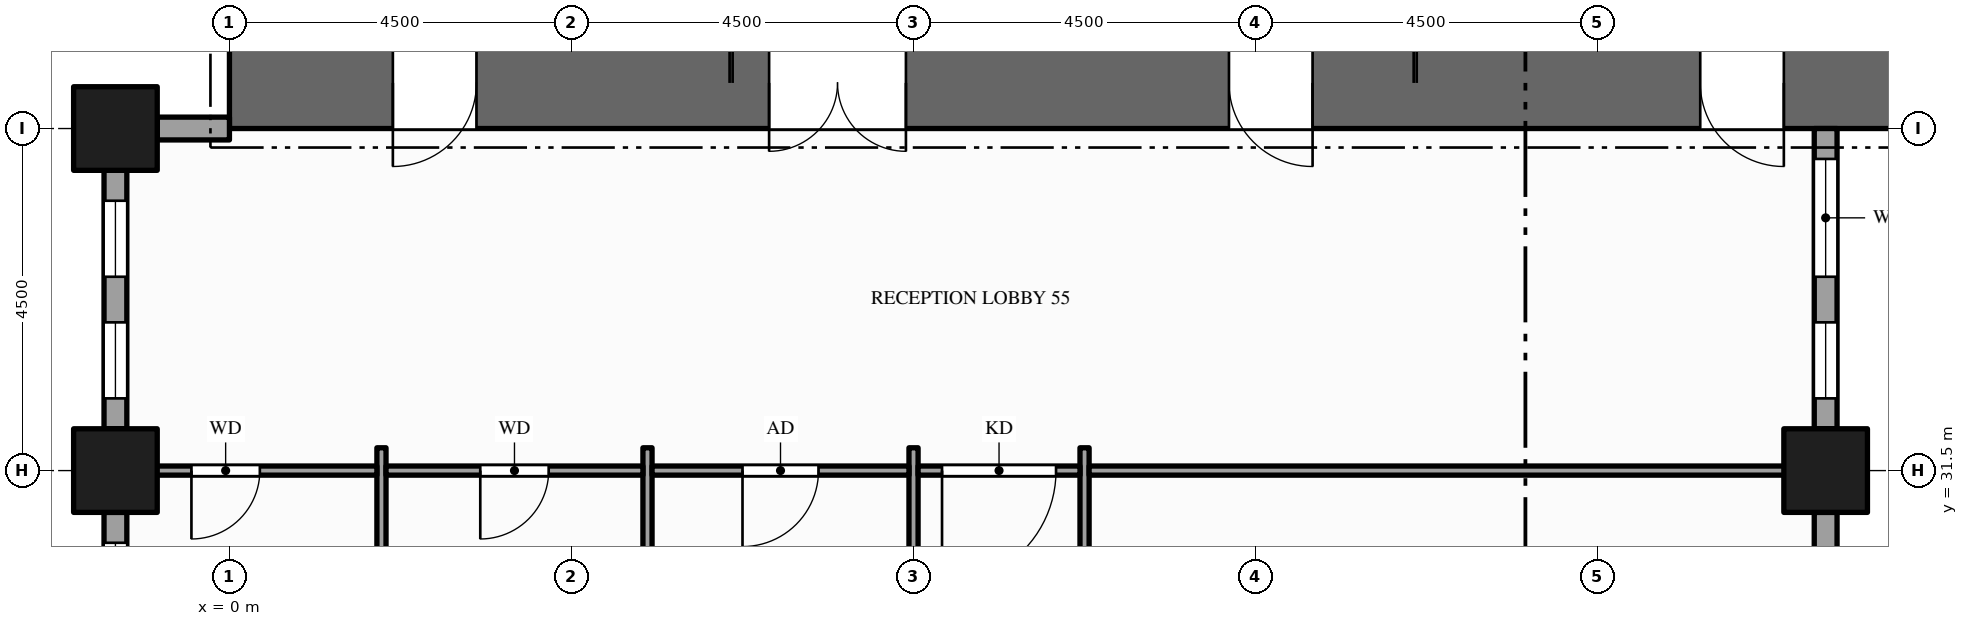
"""IFC4 building model, lengths in metres.
Left out: names, types, materials, properties, quantities, classifications, styles, units other than length and angle.
Written with IfcOpenShell. Run it as: python <this file> out.ifc"""

import sys

from ifc_helpers import new_model, si_unit, direction, frame, frame_2d, origin, origin_2d, place, context, subcontext, project, spatial, rectangle, hollow_rectangle, extrude, element, fill, save


model = new_model("IFC4")
c1 = context("Model", 3, precision=1e-05, world=origin(), true_north=direction((0.0, 1.0)))
c2 = subcontext(c1, "Body", "Model", "MODEL_VIEW")
j1 = project(units=[si_unit("LENGTHUNIT", "METRE"), si_unit("PLANEANGLEUNIT", "RADIAN")], contexts=[c1])
p1 = place(None, origin())
s1 = spatial("IfcSite", under=j1, at=p1, CompositionType="ELEMENT")
p2 = place(p1, origin())
s2 = spatial("IfcBuilding", under=s1, at=p2, CompositionType="ELEMENT")
p3 = place(p2, frame((0.0, 0.0, 69.0)))
s3 = spatial("IfcBuildingStorey", under=s2, at=p3, CompositionType="ELEMENT", Elevation=69.0)
p4 = place(p3, frame((0.0, 36.6, -0.15), z_axis=(0.0, 0.0, 1.0), x_axis=(1.0, 0.0, 0.0)))
e1 = element("IfcWall", 1, at=p4, inside=s3, PredefinedType="SHEAR", context=c2, shape_type="SweptSolid", body=[
    extrude(rectangle(XDim=22.5, YDim=1.2, at=frame_2d((11.25, 0.0))), origin(), (0.0, 0.0, 1.0), 4.0),
])
p5 = place(p4, frame((7.1, 0.0, 0.15)))
e2 = element("IfcOpeningElement", 2, at=p5, cuts=e1, PredefinedType="OPENING", context=c2, shape_type="SweptSolid", body=[
    extrude(rectangle(XDim=1.8, YDim=2.1, at=frame_2d((0.9, 1.05))), frame((0.0, 0.61, 0.0), z_axis=(0.0, -1.0, 0.0), x_axis=(1.0, 0.0, 0.0)), (0.0, 0.0, 1.0), 1.22),
])
p6 = place(p4, frame((13.15, 0.0, 0.15)))
e3 = element("IfcOpeningElement", 3, at=p6, cuts=e1, PredefinedType="OPENING", context=c2, shape_type="SweptSolid", body=[
    extrude(rectangle(XDim=1.1, YDim=2.1, at=frame_2d((0.55, 1.05))), frame((0.0, 0.61, 0.0), z_axis=(0.0, -1.0, 0.0), x_axis=(1.0, 0.0, 0.0)), (0.0, 0.0, 1.0), 1.22),
])
p7 = place(p4, frame((2.15, 0.0, 0.15)))
e4 = element("IfcOpeningElement", 4, at=p7, cuts=e1, PredefinedType="OPENING", context=c2, shape_type="SweptSolid", body=[
    extrude(rectangle(XDim=1.1, YDim=2.1, at=frame_2d((0.55, 1.05))), frame((0.0, 0.61, 0.0), z_axis=(0.0, -1.0, 0.0), x_axis=(1.0, 0.0, 0.0)), (0.0, 0.0, 1.0), 1.22),
])
p8 = place(p4, frame((19.35, 0.0, 0.15)))
e5 = element("IfcOpeningElement", 5, at=p8, cuts=e1, PredefinedType="OPENING", context=c2, shape_type="SweptSolid", body=[
    extrude(rectangle(XDim=1.1, YDim=2.1, at=frame_2d((0.55, 1.05))), frame((0.0, 0.61, 0.0), z_axis=(0.0, -1.0, 0.0), x_axis=(1.0, 0.0, 0.0)), (0.0, 0.0, 1.0), 1.22),
])
for number, where, z_axis, x_axis in (
    (6, (-1.5, 31.5, -0.15), (0.0, 0.0, 1.0), (1.0, 0.0, 0.0)),
    (7, (-1.5, 36.0, -0.15), (0.0, 0.0, 1.0), (1.0, 0.0, 0.0)),
    (8, (21.0, 31.5, -0.15), (0.0, 0.0, 1.0), (1.0, 0.0, 0.0)),
):
    element("IfcColumn", number, at=place(p3, frame(where, z_axis=z_axis, x_axis=x_axis)), inside=s3, PredefinedType="COLUMN", context=c2, shape_type="SweptSolid", body=[
        extrude(hollow_rectangle(XDim=1.1, YDim=1.1, WallThickness=0.06, at=origin_2d()), origin(), (0.0, 0.0, 1.0), 4.0),
    ])
p9 = place(p3, frame((21.0, 29.05, 0.0), z_axis=(0.0, 0.0, 1.0), x_axis=(0.0, 1.0, 0.0)))
e9 = element("IfcWall", 9, at=p9, inside=s3, PredefinedType="STANDARD", context=c2, shape_type="SweptSolid", body=[
    extrude(rectangle(XDim=1.9, YDim=0.3, at=frame_2d((0.95, 0.0))), origin(), (0.0, 0.0, 1.0), 3.144),
])
p10 = place(p3, frame((21.0, 32.05, 0.0), z_axis=(0.0, 0.0, 1.0), x_axis=(0.0, 1.0, 0.0)))
e10 = element("IfcWall", 10, at=p10, inside=s3, PredefinedType="STANDARD", context=c2, shape_type="SweptSolid", body=[
    extrude(rectangle(XDim=3.95, YDim=0.3, at=frame_2d((1.975, 0.0))), origin(), (0.0, 0.0, 1.0), 3.144),
])
p11 = place(p10, frame((0.4, 0.0, 0.9)))
e11 = element("IfcOpeningElement", 11, at=p11, cuts=e10, PredefinedType="OPENING", context=c2, shape_type="SweptSolid", body=[
    extrude(rectangle(XDim=1.0, YDim=2.0, at=frame_2d((0.5, 1.0))), frame((0.0, 0.16, 0.0), z_axis=(0.0, -1.0, 0.0), x_axis=(1.0, 0.0, 0.0)), (0.0, 0.0, 1.0), 0.32),
])
p12 = place(p10, frame((2.0, 0.0, 0.9)))
e12 = element("IfcOpeningElement", 12, at=p12, cuts=e10, PredefinedType="OPENING", context=c2, shape_type="SweptSolid", body=[
    extrude(rectangle(XDim=1.55, YDim=2.0, at=frame_2d((0.775, 1.0))), frame((0.0, 0.16, 0.0), z_axis=(0.0, -1.0, 0.0), x_axis=(1.0, 0.0, 0.0)), (0.0, 0.0, 1.0), 0.32),
])
p13 = place(p3, frame((0.0, 36.0, 0.0), z_axis=(0.0, 0.0, 1.0), x_axis=(-1.0, 0.0, 0.0)))
e13 = element("IfcWall", 13, at=p13, inside=s3, PredefinedType="STANDARD", context=c2, shape_type="SweptSolid", body=[
    extrude(rectangle(XDim=0.95, YDim=0.3, at=frame_2d((0.475, 0.0))), origin(), (0.0, 0.0, 1.0), 2.938),
])
p14 = place(p3, frame((-1.5, 35.45, 0.0), z_axis=(0.0, 0.0, 1.0), x_axis=(0.0, -1.0, 0.0)))
e14 = element("IfcWall", 14, at=p14, inside=s3, PredefinedType="STANDARD", context=c2, shape_type="SweptSolid", body=[
    extrude(rectangle(XDim=3.4, YDim=0.3, at=frame_2d((1.7, 0.0))), origin(), (0.0, 0.0, 1.0), 3.144),
])
p15 = place(p14, frame((0.4, 0.0, 0.9)))
e15 = element("IfcOpeningElement", 15, at=p15, cuts=e14, PredefinedType="OPENING", context=c2, shape_type="SweptSolid", body=[
    extrude(rectangle(XDim=1.0, YDim=2.0, at=frame_2d((0.5, 1.0))), frame((0.0, 0.16, 0.0), z_axis=(0.0, -1.0, 0.0), x_axis=(1.0, 0.0, 0.0)), (0.0, 0.0, 1.0), 0.32),
])
p16 = place(p14, frame((2.0, 0.0, 0.9)))
e16 = element("IfcOpeningElement", 16, at=p16, cuts=e14, PredefinedType="OPENING", context=c2, shape_type="SweptSolid", body=[
    extrude(rectangle(XDim=1.0, YDim=2.0, at=frame_2d((0.5, 1.0))), frame((0.0, 0.16, 0.0), z_axis=(0.0, -1.0, 0.0), x_axis=(1.0, 0.0, 0.0)), (0.0, 0.0, 1.0), 0.32),
])
p17 = place(p3, frame((-1.5, 30.95, 0.0), z_axis=(0.0, 0.0, 1.0), x_axis=(0.0, -1.0, 0.0)))
e17 = element("IfcWall", 17, at=p17, inside=s3, PredefinedType="STANDARD", context=c2, shape_type="SweptSolid", body=[
    extrude(rectangle(XDim=3.4, YDim=0.3, at=frame_2d((1.7, 0.0))), origin(), (0.0, 0.0, 1.0), 3.144),
])
p18 = place(p17, frame((0.4, 0.0, 0.9)))
e18 = element("IfcOpeningElement", 18, at=p18, cuts=e17, PredefinedType="OPENING", context=c2, shape_type="SweptSolid", body=[
    extrude(rectangle(XDim=1.0, YDim=2.0, at=frame_2d((0.5, 1.0))), frame((0.0, 0.16, 0.0), z_axis=(0.0, -1.0, 0.0), x_axis=(1.0, 0.0, 0.0)), (0.0, 0.0, 1.0), 0.32),
])
p19 = place(p17, frame((2.0, 0.0, 0.9)))
e19 = element("IfcOpeningElement", 19, at=p19, cuts=e17, PredefinedType="OPENING", context=c2, shape_type="SweptSolid", body=[
    extrude(rectangle(XDim=1.0, YDim=2.0, at=frame_2d((0.5, 1.0))), frame((0.0, 0.16, 0.0), z_axis=(0.0, -1.0, 0.0), x_axis=(1.0, 0.0, 0.0)), (0.0, 0.0, 1.0), 0.32),
])
for number, where, z_axis, x_axis in (
    (20, (2.0, 26.7, 0.0), (0.0, 0.0, 1.0), (0.0, 1.0, 0.0)),
    (21, (5.5, 26.7, 0.0), (0.0, 0.0, 1.0), (0.0, 1.0, 0.0)),
):
    element("IfcWall", number, at=place(p3, frame(where, z_axis=z_axis, x_axis=x_axis)), inside=s3, PredefinedType="PARTITIONING", context=c2, shape_type="SweptSolid", body=[
        extrude(rectangle(XDim=5.1, YDim=0.12, at=frame_2d((2.55, 0.0))), origin(), (0.0, 0.0, 1.0), 3.85),
    ])
p20 = place(p3, frame((9.0, 10.95, 0.0), z_axis=(0.0, 0.0, 1.0), x_axis=(0.0, 1.0, 0.0)))
e22 = element("IfcWall", 22, at=p20, inside=s3, PredefinedType="PARTITIONING", context=c2, shape_type="SweptSolid", body=[
    extrude(rectangle(XDim=20.85, YDim=0.12, at=frame_2d((10.425, 0.0))), origin(), (0.0, 0.0, 1.0), 2.6),
])
p21 = place(p20, frame((3.9, 0.0, 0.0)))
e23 = element("IfcOpeningElement", 23, at=p21, cuts=e22, PredefinedType="OPENING", context=c2, shape_type="SweptSolid", body=[
    extrude(rectangle(XDim=1.8, YDim=2.1, at=frame_2d((0.9, 1.05))), frame((0.0, 0.07, 0.0), z_axis=(0.0, -1.0, 0.0), x_axis=(1.0, 0.0, 0.0)), (0.0, 0.0, 1.0), 0.14),
])
p22 = place(p20, frame((12.205, 0.0, 0.0)))
e24 = element("IfcOpeningElement", 24, at=p22, cuts=e22, PredefinedType="OPENING", context=c2, shape_type="SweptSolid", body=[
    extrude(rectangle(XDim=1.0, YDim=2.1, at=frame_2d((0.5, 1.05))), frame((0.0, 0.07, 0.0), z_axis=(0.0, -1.0, 0.0), x_axis=(1.0, 0.0, 0.0)), (0.0, 0.0, 1.0), 0.14),
])
p23 = place(p3, frame((11.25, 10.95, 0.0), z_axis=(0.0, 0.0, 1.0), x_axis=(0.0, 1.0, 0.0)))
e25 = element("IfcWall", 25, at=p23, inside=s3, PredefinedType="PARTITIONING", context=c2, shape_type="SweptSolid", body=[
    extrude(rectangle(XDim=20.85, YDim=0.12, at=frame_2d((10.425, 0.0))), origin(), (0.0, 0.0, 1.0), 2.6),
])
p24 = place(p23, frame((4.2, 0.0, 0.0)))
e26 = element("IfcOpeningElement", 26, at=p24, cuts=e25, PredefinedType="OPENING", context=c2, shape_type="SweptSolid", body=[
    extrude(rectangle(XDim=1.2, YDim=2.1, at=frame_2d((0.6, 1.05))), frame((0.0, 0.07, 0.0), z_axis=(0.0, -1.0, 0.0), x_axis=(1.0, 0.0, 0.0)), (0.0, 0.0, 1.0), 0.14),
])
p25 = place(p3, frame((-1.35, 31.5, 0.0), z_axis=(0.0, 0.0, 1.0), x_axis=(1.0, 0.0, 0.0)))
e27 = element("IfcWall", 27, at=p25, inside=s3, PredefinedType="PARTITIONING", context=c2, shape_type="SweptSolid", body=[
    extrude(rectangle(XDim=3.29, YDim=0.12, at=frame_2d((1.645, 0.0))), origin(), (0.0, 0.0, 1.0), 2.938),
])
p26 = place(p25, frame((0.85, 0.0, 0.0)))
e28 = element("IfcOpeningElement", 28, at=p26, cuts=e27, PredefinedType="OPENING", context=c2, shape_type="SweptSolid", body=[
    extrude(rectangle(XDim=0.9, YDim=2.1, at=frame_2d((0.45, 1.05))), frame((0.0, 0.07, 0.0), z_axis=(0.0, -1.0, 0.0), x_axis=(1.0, 0.0, 0.0)), (0.0, 0.0, 1.0), 0.14),
])
p27 = place(p3, frame((2.06, 31.5, 0.0), z_axis=(0.0, 0.0, 1.0), x_axis=(1.0, 0.0, 0.0)))
e29 = element("IfcWall", 29, at=p27, inside=s3, PredefinedType="PARTITIONING", context=c2, shape_type="SweptSolid", body=[
    extrude(rectangle(XDim=3.38, YDim=0.12, at=frame_2d((1.69, 0.0))), origin(), (0.0, 0.0, 1.0), 2.938),
])
p28 = place(p27, frame((1.24, 0.0, 0.0)))
e30 = element("IfcOpeningElement", 30, at=p28, cuts=e29, PredefinedType="OPENING", context=c2, shape_type="SweptSolid", body=[
    extrude(rectangle(XDim=0.9, YDim=2.1, at=frame_2d((0.45, 1.05))), frame((0.0, 0.07, 0.0), z_axis=(0.0, -1.0, 0.0), x_axis=(1.0, 0.0, 0.0)), (0.0, 0.0, 1.0), 0.14),
])
p29 = place(p3, frame((5.56, 31.5, 0.0), z_axis=(0.0, 0.0, 1.0), x_axis=(1.0, 0.0, 0.0)))
e31 = element("IfcWall", 31, at=p29, inside=s3, PredefinedType="PARTITIONING", context=c2, shape_type="SweptSolid", body=[
    extrude(rectangle(XDim=3.38, YDim=0.12, at=frame_2d((1.69, 0.0))), origin(), (0.0, 0.0, 1.0), 2.938),
])
p30 = place(p29, frame((1.19, 0.0, 0.0)))
e32 = element("IfcOpeningElement", 32, at=p30, cuts=e31, PredefinedType="OPENING", context=c2, shape_type="SweptSolid", body=[
    extrude(rectangle(XDim=1.0, YDim=2.1, at=frame_2d((0.5, 1.05))), frame((0.0, 0.07, 0.0), z_axis=(0.0, -1.0, 0.0), x_axis=(1.0, 0.0, 0.0)), (0.0, 0.0, 1.0), 0.14),
])
p31 = place(p3, frame((9.06, 31.5, 0.0), z_axis=(0.0, 0.0, 1.0), x_axis=(1.0, 0.0, 0.0)))
e33 = element("IfcWall", 33, at=p31, inside=s3, PredefinedType="PARTITIONING", context=c2, shape_type="SweptSolid", body=[
    extrude(rectangle(XDim=2.13, YDim=0.12, at=frame_2d((1.065, 0.0))), origin(), (0.0, 0.0, 1.0), 2.938),
])
p32 = place(p31, frame((0.315, 0.0, 0.0)))
e34 = element("IfcOpeningElement", 34, at=p32, cuts=e33, PredefinedType="OPENING", context=c2, shape_type="SweptSolid", body=[
    extrude(rectangle(XDim=1.5, YDim=2.1, at=frame_2d((0.75, 1.05))), frame((0.0, 0.07, 0.0), z_axis=(0.0, -1.0, 0.0), x_axis=(1.0, 0.0, 0.0)), (0.0, 0.0, 1.0), 0.14),
])
p33 = place(p3, frame((11.31, 31.5, 0.0), z_axis=(0.0, 0.0, 1.0), x_axis=(1.0, 0.0, 0.0)))
e35 = element("IfcWall", 35, at=p33, inside=s3, PredefinedType="PARTITIONING", context=c2, shape_type="SweptSolid", body=[
    extrude(rectangle(XDim=9.54, YDim=0.12, at=frame_2d((4.77, 0.0))), origin(), (0.0, 0.0, 1.0), 2.938),
])
p34 = place(p11, origin())
e36 = element("IfcWindow", 36, at=p34, inside=s3, PartitioningType="SINGLE_PANEL", PredefinedType="WINDOW", context=c2, shape_type="SweptSolid", body=[
    extrude(rectangle(XDim=1.0, YDim=2.0, at=frame_2d((0.5, 1.0))), frame((0.0, 0.03, 0.0), z_axis=(0.0, -1.0, 0.0), x_axis=(1.0, 0.0, 0.0)), (0.0, 0.0, 1.0), 0.06),
])
fill(e11, e36)
p35 = place(p12, origin())
e37 = element("IfcWindow", 37, at=p35, inside=s3, PartitioningType="SINGLE_PANEL", PredefinedType="WINDOW", context=c2, shape_type="SweptSolid", body=[
    extrude(rectangle(XDim=1.55, YDim=2.0, at=frame_2d((0.775, 1.0))), frame((0.0, 0.03, 0.0), z_axis=(0.0, -1.0, 0.0), x_axis=(1.0, 0.0, 0.0)), (0.0, 0.0, 1.0), 0.06),
])
fill(e12, e37)
p36 = place(p15, origin())
e38 = element("IfcWindow", 38, at=p36, inside=s3, PartitioningType="SINGLE_PANEL", PredefinedType="WINDOW", context=c2, shape_type="SweptSolid", body=[
    extrude(rectangle(XDim=1.0, YDim=2.0, at=frame_2d((0.5, 1.0))), frame((0.0, 0.03, 0.0), z_axis=(0.0, -1.0, 0.0), x_axis=(1.0, 0.0, 0.0)), (0.0, 0.0, 1.0), 0.06),
])
fill(e15, e38)
p37 = place(p16, origin())
e39 = element("IfcWindow", 39, at=p37, inside=s3, PartitioningType="SINGLE_PANEL", PredefinedType="WINDOW", context=c2, shape_type="SweptSolid", body=[
    extrude(rectangle(XDim=1.0, YDim=2.0, at=frame_2d((0.5, 1.0))), frame((0.0, 0.03, 0.0), z_axis=(0.0, -1.0, 0.0), x_axis=(1.0, 0.0, 0.0)), (0.0, 0.0, 1.0), 0.06),
])
fill(e16, e39)
p38 = place(p18, origin())
e40 = element("IfcWindow", 40, at=p38, inside=s3, PartitioningType="SINGLE_PANEL", PredefinedType="WINDOW", context=c2, shape_type="SweptSolid", body=[
    extrude(rectangle(XDim=1.0, YDim=2.0, at=frame_2d((0.5, 1.0))), frame((0.0, 0.03, 0.0), z_axis=(0.0, -1.0, 0.0), x_axis=(1.0, 0.0, 0.0)), (0.0, 0.0, 1.0), 0.06),
])
fill(e18, e40)
p39 = place(p5, origin())
e41 = element("IfcDoor", 41, at=p39, inside=s3, OperationType="DOUBLE_DOOR_SINGLE_SWING", PredefinedType="DOOR", context=c2, shape_type="SweptSolid", body=[
    extrude(rectangle(XDim=1.8, YDim=2.1, at=frame_2d((0.9, 1.05))), frame((0.0, 0.025, 0.0), z_axis=(0.0, -1.0, 0.0), x_axis=(1.0, 0.0, 0.0)), (0.0, 0.0, 1.0), 0.05),
])
fill(e2, e41)
p40 = place(p6, origin())
e42 = element("IfcDoor", 42, at=p40, inside=s3, OperationType="SINGLE_SWING_RIGHT", PredefinedType="DOOR", context=c2, shape_type="SweptSolid", body=[
    extrude(rectangle(XDim=1.1, YDim=2.1, at=frame_2d((0.55, 1.05))), frame((0.0, 0.025, 0.0), z_axis=(0.0, -1.0, 0.0), x_axis=(1.0, 0.0, 0.0)), (0.0, 0.0, 1.0), 0.05),
])
fill(e3, e42)
p41 = place(p7, origin())
e43 = element("IfcDoor", 43, at=p41, inside=s3, OperationType="SINGLE_SWING_LEFT", PredefinedType="DOOR", context=c2, shape_type="SweptSolid", body=[
    extrude(rectangle(XDim=1.1, YDim=2.1, at=frame_2d((0.55, 1.05))), frame((0.0, 0.025, 0.0), z_axis=(0.0, -1.0, 0.0), x_axis=(1.0, 0.0, 0.0)), (0.0, 0.0, 1.0), 0.05),
])
fill(e4, e43)
p42 = place(p8, origin())
e44 = element("IfcDoor", 44, at=p42, inside=s3, OperationType="SINGLE_SWING_RIGHT", PredefinedType="DOOR", context=c2, shape_type="SweptSolid", body=[
    extrude(rectangle(XDim=1.1, YDim=2.1, at=frame_2d((0.55, 1.05))), frame((0.0, 0.025, 0.0), z_axis=(0.0, -1.0, 0.0), x_axis=(1.0, 0.0, 0.0)), (0.0, 0.0, 1.0), 0.05),
])
fill(e5, e44)
p43 = place(p32, origin())
e45 = element("IfcDoor", 45, at=p43, inside=s3, OperationType="SINGLE_SWING_LEFT", PredefinedType="DOOR", context=c2, shape_type="SweptSolid", body=[
    extrude(rectangle(XDim=1.5, YDim=2.1, at=frame_2d((0.75, 1.05))), frame((0.0, 0.025, 0.0), z_axis=(0.0, -1.0, 0.0), x_axis=(1.0, 0.0, 0.0)), (0.0, 0.0, 1.0), 0.05),
])
fill(e34, e45)
p44 = place(p26, origin())
e46 = element("IfcDoor", 46, at=p44, inside=s3, OperationType="SINGLE_SWING_LEFT", PredefinedType="DOOR", context=c2, shape_type="SweptSolid", body=[
    extrude(rectangle(XDim=0.9, YDim=2.1, at=frame_2d((0.45, 1.05))), frame((0.0, 0.025, 0.0), z_axis=(0.0, -1.0, 0.0), x_axis=(1.0, 0.0, 0.0)), (0.0, 0.0, 1.0), 0.05),
])
fill(e28, e46)
p45 = place(p28, origin())
e47 = element("IfcDoor", 47, at=p45, inside=s3, OperationType="SINGLE_SWING_LEFT", PredefinedType="DOOR", context=c2, shape_type="SweptSolid", body=[
    extrude(rectangle(XDim=0.9, YDim=2.1, at=frame_2d((0.45, 1.05))), frame((0.0, 0.025, 0.0), z_axis=(0.0, -1.0, 0.0), x_axis=(1.0, 0.0, 0.0)), (0.0, 0.0, 1.0), 0.05),
])
fill(e30, e47)
p46 = place(p30, origin())
e48 = element("IfcDoor", 48, at=p46, inside=s3, OperationType="SINGLE_SWING_LEFT", PredefinedType="DOOR", context=c2, shape_type="SweptSolid", body=[
    extrude(rectangle(XDim=1.0, YDim=2.1, at=frame_2d((0.5, 1.05))), frame((0.0, 0.025, 0.0), z_axis=(0.0, -1.0, 0.0), x_axis=(1.0, 0.0, 0.0)), (0.0, 0.0, 1.0), 0.05),
])
fill(e32, e48)
save(model, sys.argv[1])
